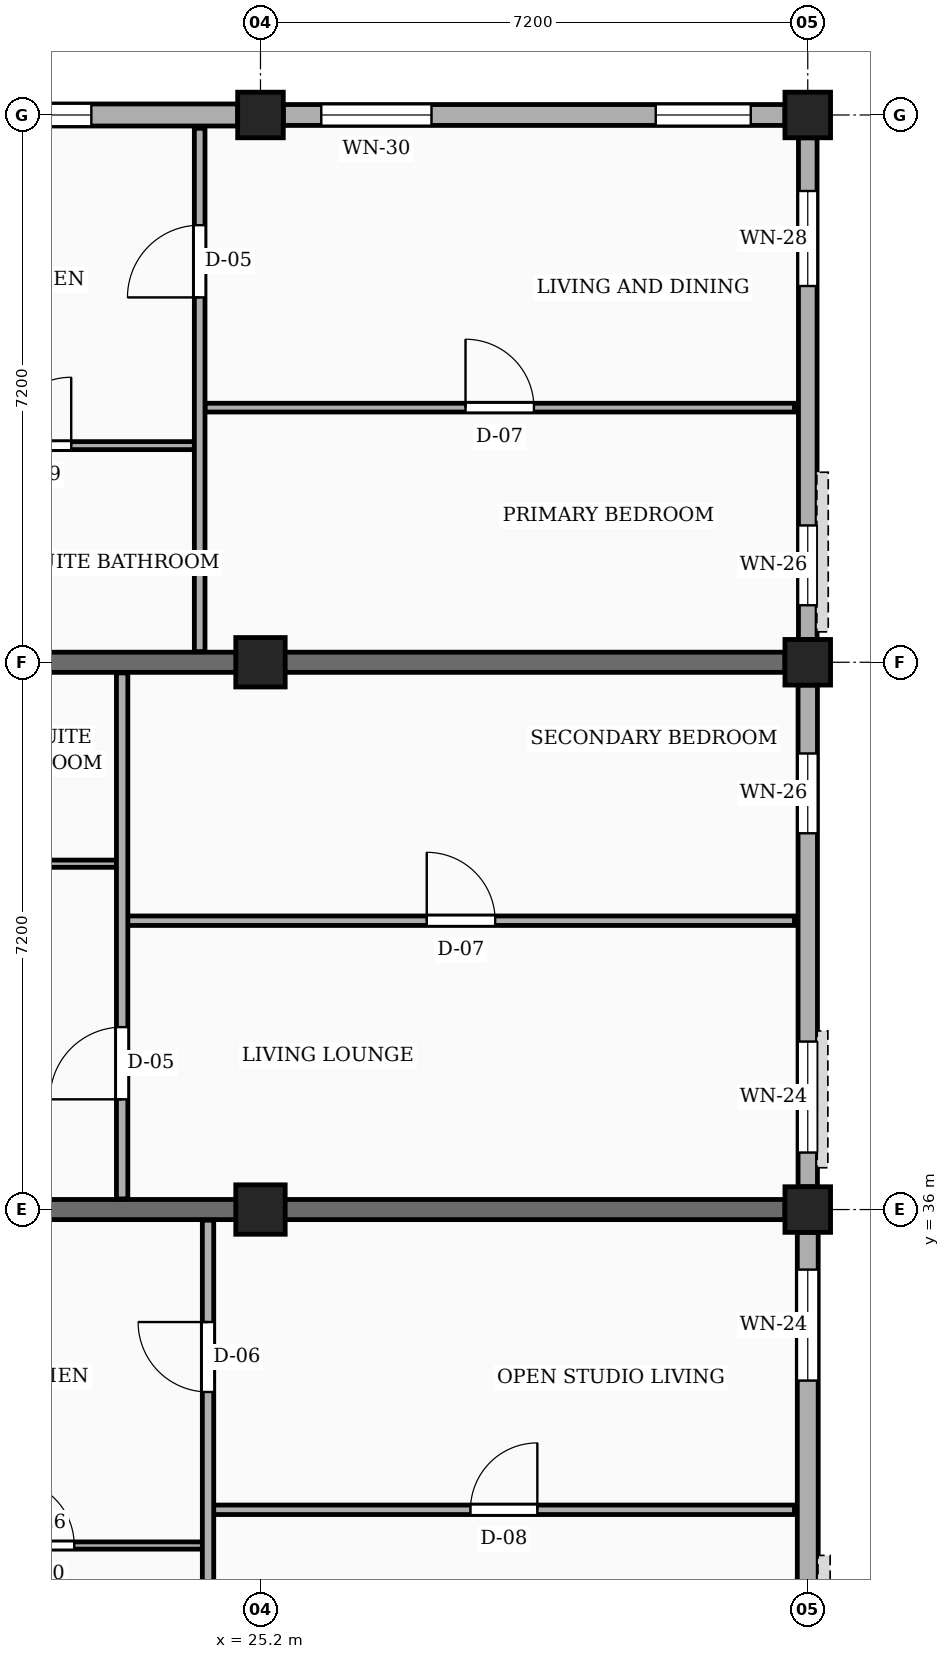
"""IFC4 building model, lengths in metres.
Left out: names, types, materials, properties, quantities, classifications, styles, units other than length and angle.
Written with IfcOpenShell. Run it as: python <this file> out.ifc"""

import sys

from ifc_helpers import new_model, si_unit, direction, frame, frame_2d, origin, origin_2d, place, context, subcontext, project, spatial, rectangle, extrude, element, fill, save


model = new_model("IFC4")
c1 = context("Model", 3, precision=1e-05, world=origin(), true_north=direction((0.0, 1.0)))
c2 = subcontext(c1, "Body", "Model", "MODEL_VIEW")
j1 = project(units=[si_unit("LENGTHUNIT", "METRE"), si_unit("PLANEANGLEUNIT", "RADIAN")], contexts=[c1])
p1 = place(None, origin())
s1 = spatial("IfcSite", under=j1, at=p1, CompositionType="ELEMENT")
p2 = place(p1, origin())
s2 = spatial("IfcBuilding", under=s1, at=p2, CompositionType="ELEMENT")
p3 = place(p2, frame((0.0, 0.0, 4.5)))
s3 = spatial("IfcBuildingStorey", under=s2, at=p3, CompositionType="ELEMENT", Elevation=4.5)
for number, where, z_axis, x_axis in (
    (1, (25.2, 36.0, 0.0), (0.0, 0.0, 1.0), (1.0, 0.0, 0.0)),
    (2, (25.2, 43.2, 0.0), (0.0, 0.0, 1.0), (1.0, 0.0, 0.0)),
):
    element("IfcColumn", number, at=place(p3, frame(where, z_axis=z_axis, x_axis=x_axis)), inside=s3, PredefinedType="COLUMN", context=c2, shape_type="SweptSolid", body=[
        extrude(rectangle(XDim=0.65, YDim=0.65, at=origin_2d()), origin(), (0.0, 0.0, 1.0), 3.15),
    ])
for number, where, z_axis, x_axis in (
    (3, (25.2, 50.4, 0.0), (0.0, 0.0, 1.0), (1.0, 0.0, 0.0)),
    (4, (32.4, 36.0, 0.0), (0.0, 0.0, 1.0), (1.0, 0.0, 0.0)),
    (5, (32.4, 43.2, 0.0), (0.0, 0.0, 1.0), (1.0, 0.0, 0.0)),
    (6, (32.4, 50.4, 0.0), (0.0, 0.0, 1.0), (1.0, 0.0, 0.0)),
):
    element("IfcColumn", number, at=place(p3, frame(where, z_axis=z_axis, x_axis=x_axis)), inside=s3, PredefinedType="COLUMN", context=c2, shape_type="SweptSolid", body=[
        extrude(rectangle(XDim=0.6, YDim=0.6, at=origin_2d()), origin(), (0.0, 0.0, 1.0), 3.15),
    ])
for number, where, z_axis, x_axis in (
    (7, (20.1, 36.0, 0.0), (0.0, 0.0, 1.0), (1.0, 0.0, 0.0)),
    (8, (20.1, 43.2, 0.0), (0.0, 0.0, 1.0), (1.0, 0.0, 0.0)),
):
    element("IfcWall", number, at=place(p3, frame(where, z_axis=z_axis, x_axis=x_axis)), inside=s3, PredefinedType="SOLIDWALL", context=c2, shape_type="SweptSolid", body=[
        extrude(rectangle(XDim=12.0, YDim=0.265, at=frame_2d((6.0, 0.0))), origin(), (0.0, 0.0, 1.0), 2.17),
    ])
p4 = place(p3, frame((32.4, 29.1, 0.0), z_axis=(0.0, 0.0, 1.0), x_axis=(0.0, 1.0, 0.0)))
e9 = element("IfcWall", 9, at=p4, inside=s3, PredefinedType="SOLIDWALL", context=c2, shape_type="SweptSolid", body=[
    extrude(rectangle(XDim=6.6, YDim=0.275, at=frame_2d((3.3, 0.0))), origin(), (0.0, 0.0, 1.0), 2.44),
])
p5 = place(p4, frame((0.45, 0.0, 0.78)))
e10 = element("IfcOpeningElement", 10, at=p5, cuts=e9, PredefinedType="OPENING", context=c2, shape_type="SweptSolid", body=[
    extrude(rectangle(XDim=1.3, YDim=1.36, at=frame_2d((0.65, 0.68))), frame((0.0, 0.147, 0.0), z_axis=(0.0, -1.0, 0.0), x_axis=(1.0, 0.0, 0.0)), (0.0, 0.0, 1.0), 0.295),
])
p6 = place(p4, frame((4.65, 0.0, 0.78)))
e11 = element("IfcOpeningElement", 11, at=p6, cuts=e9, PredefinedType="OPENING", context=c2, shape_type="SweptSolid", body=[
    extrude(rectangle(XDim=1.46, YDim=1.36, at=frame_2d((0.73, 0.68))), frame((0.0, 0.147, 0.0), z_axis=(0.0, -1.0, 0.0), x_axis=(1.0, 0.0, 0.0)), (0.0, 0.0, 1.0), 0.295),
])
p7 = place(p3, frame((32.4, 36.3, 0.0), z_axis=(0.0, 0.0, 1.0), x_axis=(0.0, 1.0, 0.0)))
e12 = element("IfcWall", 12, at=p7, inside=s3, PredefinedType="SOLIDWALL", context=c2, shape_type="SweptSolid", body=[
    extrude(rectangle(XDim=6.6, YDim=0.255, at=frame_2d((3.3, 0.0))), origin(), (0.0, 0.0, 1.0), 2.44),
])
p8 = place(p7, frame((0.45, 0.0, 0.78)))
e13 = element("IfcOpeningElement", 13, at=p8, cuts=e12, PredefinedType="OPENING", context=c2, shape_type="SweptSolid", body=[
    extrude(rectangle(XDim=1.46, YDim=1.36, at=frame_2d((0.73, 0.68))), frame((0.0, 0.137, 0.0), z_axis=(0.0, -1.0, 0.0), x_axis=(1.0, 0.0, 0.0)), (0.0, 0.0, 1.0), 0.275),
])
p9 = place(p7, frame((4.65, 0.0, 0.78)))
e14 = element("IfcOpeningElement", 14, at=p9, cuts=e12, PredefinedType="OPENING", context=c2, shape_type="SweptSolid", body=[
    extrude(rectangle(XDim=1.05, YDim=1.44, at=frame_2d((0.525, 0.72))), frame((0.0, 0.137, 0.0), z_axis=(0.0, -1.0, 0.0), x_axis=(1.0, 0.0, 0.0)), (0.0, 0.0, 1.0), 0.275),
])
p10 = place(p3, frame((32.4, 43.5, 0.0), z_axis=(0.0, 0.0, 1.0), x_axis=(0.0, 1.0, 0.0)))
e15 = element("IfcWall", 15, at=p10, inside=s3, PredefinedType="SOLIDWALL", context=c2, shape_type="SweptSolid", body=[
    extrude(rectangle(XDim=6.6, YDim=0.245, at=frame_2d((3.3, 0.0))), origin(), (0.0, 0.0, 1.0), 2.44),
])
p11 = place(p10, frame((0.45, 0.0, 0.78)))
e16 = element("IfcOpeningElement", 16, at=p11, cuts=e15, PredefinedType="OPENING", context=c2, shape_type="SweptSolid", body=[
    extrude(rectangle(XDim=1.05, YDim=1.44, at=frame_2d((0.525, 0.72))), frame((0.0, 0.133, 0.0), z_axis=(0.0, -1.0, 0.0), x_axis=(1.0, 0.0, 0.0)), (0.0, 0.0, 1.0), 0.265),
])
p12 = place(p10, frame((4.65, 0.0, 0.78)))
e17 = element("IfcOpeningElement", 17, at=p12, cuts=e15, PredefinedType="OPENING", context=c2, shape_type="SweptSolid", body=[
    extrude(rectangle(XDim=1.25, YDim=1.44, at=frame_2d((0.625, 0.72))), frame((0.0, 0.133, 0.0), z_axis=(0.0, -1.0, 0.0), x_axis=(1.0, 0.0, 0.0)), (0.0, 0.0, 1.0), 0.265),
])
p13 = place(p3, frame((32.1, 50.4, 0.0), z_axis=(0.0, 0.0, 1.0), x_axis=(-1.0, 0.0, 0.0)))
e18 = element("IfcWall", 18, at=p13, inside=s3, PredefinedType="SOLIDWALL", context=c2, shape_type="SweptSolid", body=[
    extrude(rectangle(XDim=6.6, YDim=0.275, at=frame_2d((3.3, 0.0))), origin(), (0.0, 0.0, 1.0), 2.44),
])
p14 = place(p13, frame((0.45, 0.0, 0.78)))
e19 = element("IfcOpeningElement", 19, at=p14, cuts=e18, PredefinedType="OPENING", context=c2, shape_type="SweptSolid", body=[
    extrude(rectangle(XDim=1.25, YDim=1.44, at=frame_2d((0.625, 0.72))), frame((0.0, 0.147, 0.0), z_axis=(0.0, -1.0, 0.0), x_axis=(1.0, 0.0, 0.0)), (0.0, 0.0, 1.0), 0.295),
])
p15 = place(p13, frame((4.65, 0.0, 0.78)))
e20 = element("IfcOpeningElement", 20, at=p15, cuts=e18, PredefinedType="OPENING", context=c2, shape_type="SweptSolid", body=[
    extrude(rectangle(XDim=1.45, YDim=1.44, at=frame_2d((0.725, 0.72))), frame((0.0, 0.147, 0.0), z_axis=(0.0, -1.0, 0.0), x_axis=(1.0, 0.0, 0.0)), (0.0, 0.0, 1.0), 0.295),
])
p16 = place(p3, frame((24.9, 50.4, 0.0), z_axis=(0.0, 0.0, 1.0), x_axis=(-1.0, 0.0, 0.0)))
e21 = element("IfcWall", 21, at=p16, inside=s3, PredefinedType="SOLIDWALL", context=c2, shape_type="SweptSolid", body=[
    extrude(rectangle(XDim=6.6, YDim=0.29, at=frame_2d((3.3, 0.0))), origin(), (0.0, 0.0, 1.0), 2.44),
])
p17 = place(p16, frame((1.925, 0.0, 0.78)))
e22 = element("IfcOpeningElement", 22, at=p17, cuts=e21, PredefinedType="OPENING", context=c2, shape_type="SweptSolid", body=[
    extrude(rectangle(XDim=1.45, YDim=1.44, at=frame_2d((0.725, 0.72))), frame((0.0, 0.155, 0.0), z_axis=(0.0, -1.0, 0.0), x_axis=(1.0, 0.0, 0.0)), (0.0, 0.0, 1.0), 0.31),
])
p18 = place(p16, frame((5.17, 0.0, 0.78)))
e23 = element("IfcOpeningElement", 23, at=p18, cuts=e21, PredefinedType="OPENING", context=c2, shape_type="SweptSolid", body=[
    extrude(rectangle(XDim=0.92, YDim=1.15, at=frame_2d((0.46, 0.575))), frame((0.0, 0.155, 0.0), z_axis=(0.0, -1.0, 0.0), x_axis=(1.0, 0.0, 0.0)), (0.0, 0.0, 1.0), 0.31),
])
p19 = place(p3, frame((24.58, 32.05, 0.0), z_axis=(0.0, 0.0, 1.0), x_axis=(1.0, 0.0, 0.0)))
e24 = element("IfcWall", 24, at=p19, inside=s3, PredefinedType="PARTITIONING", context=c2, shape_type="SweptSolid", body=[
    extrude(rectangle(XDim=7.645, YDim=0.125, at=frame_2d((3.823, 0.0))), origin(), (0.0, 0.0, 1.0), 2.305),
])
p20 = place(p19, frame((3.383, 0.0, 0.0)))
e25 = element("IfcOpeningElement", 25, at=p20, cuts=e24, PredefinedType="OPENING", context=c2, shape_type="SweptSolid", body=[
    extrude(rectangle(XDim=0.88, YDim=2.08, at=frame_2d((0.44, 1.04))), frame((0.0, 0.073, 0.0), z_axis=(0.0, -1.0, 0.0), x_axis=(1.0, 0.0, 0.0)), (0.0, 0.0, 1.0), 0.145),
])
p21 = place(p3, frame((20.19, 31.58, 0.0), z_axis=(0.0, 0.0, 1.0), x_axis=(1.0, 0.0, 0.0)))
e26 = element("IfcWall", 26, at=p21, inside=s3, PredefinedType="PARTITIONING", context=c2, shape_type="SweptSolid", body=[
    extrude(rectangle(XDim=4.25, YDim=0.095, at=frame_2d((2.125, 0.0))), origin(), (0.0, 0.0, 1.0), 2.305),
])
p22 = place(p21, frame((1.69, 0.0, 0.0)))
e27 = element("IfcOpeningElement", 27, at=p22, cuts=e26, PredefinedType="OPENING", context=c2, shape_type="SweptSolid", body=[
    extrude(rectangle(XDim=0.87, YDim=2.05, at=frame_2d((0.435, 1.025))), frame((0.0, 0.058, 0.0), z_axis=(0.0, -1.0, 0.0), x_axis=(1.0, 0.0, 0.0)), (0.0, 0.0, 1.0), 0.115),
])
p23 = place(p3, frame((24.51, 28.94, 0.0), z_axis=(0.0, 0.0, 1.0), x_axis=(0.0, 1.0, 0.0)))
e28 = element("IfcWall", 28, at=p23, inside=s3, PredefinedType="PARTITIONING", context=c2, shape_type="SweptSolid", body=[
    extrude(rectangle(XDim=6.92, YDim=0.15, at=frame_2d((3.46, 0.0))), origin(), (0.0, 0.0, 1.0), 2.305),
])
p24 = place(p23, frame((4.66, 0.0, 0.0)))
e29 = element("IfcOpeningElement", 29, at=p24, cuts=e28, PredefinedType="OPENING", context=c2, shape_type="SweptSolid", body=[
    extrude(rectangle(XDim=0.92, YDim=2.1, at=frame_2d((0.46, 1.05))), frame((0.0, 0.085, 0.0), z_axis=(0.0, -1.0, 0.0), x_axis=(1.0, 0.0, 0.0)), (0.0, 0.0, 1.0), 0.17),
])
p25 = place(p3, frame((23.45, 39.8, 0.0), z_axis=(0.0, 0.0, 1.0), x_axis=(1.0, 0.0, 0.0)))
e30 = element("IfcWall", 30, at=p25, inside=s3, PredefinedType="PARTITIONING", context=c2, shape_type="SweptSolid", body=[
    extrude(rectangle(XDim=8.775, YDim=0.125, at=frame_2d((4.388, 0.0))), origin(), (0.0, 0.0, 1.0), 2.305),
])
p26 = place(p25, frame((3.938, 0.0, 0.0)))
e31 = element("IfcOpeningElement", 31, at=p26, cuts=e30, PredefinedType="OPENING", context=c2, shape_type="SweptSolid", body=[
    extrude(rectangle(XDim=0.9, YDim=2.1, at=frame_2d((0.45, 1.05))), frame((0.0, 0.073, 0.0), z_axis=(0.0, -1.0, 0.0), x_axis=(1.0, 0.0, 0.0)), (0.0, 0.0, 1.0), 0.145),
])
p27 = place(p3, frame((20.19, 40.55, 0.0), z_axis=(0.0, 0.0, 1.0), x_axis=(1.0, 0.0, 0.0)))
e32 = element("IfcWall", 32, at=p27, inside=s3, PredefinedType="PARTITIONING", context=c2, shape_type="SweptSolid", body=[
    extrude(rectangle(XDim=3.12, YDim=0.095, at=frame_2d((1.56, 0.0))), origin(), (0.0, 0.0, 1.0), 2.305),
])
p28 = place(p27, frame((1.11, 0.0, 0.0)))
e33 = element("IfcOpeningElement", 33, at=p28, cuts=e32, PredefinedType="OPENING", context=c2, shape_type="SweptSolid", body=[
    extrude(rectangle(XDim=0.9, YDim=2.05, at=frame_2d((0.45, 1.025))), frame((0.0, 0.058, 0.0), z_axis=(0.0, -1.0, 0.0), x_axis=(1.0, 0.0, 0.0)), (0.0, 0.0, 1.0), 0.115),
])
p29 = place(p3, frame((23.38, 36.14, 0.0), z_axis=(0.0, 0.0, 1.0), x_axis=(0.0, 1.0, 0.0)))
e34 = element("IfcWall", 34, at=p29, inside=s3, PredefinedType="PARTITIONING", context=c2, shape_type="SweptSolid", body=[
    extrude(rectangle(XDim=6.92, YDim=0.15, at=frame_2d((3.46, 0.0))), origin(), (0.0, 0.0, 1.0), 2.305),
])
p30 = place(p29, frame((1.31, 0.0, 0.0)))
e35 = element("IfcOpeningElement", 35, at=p30, cuts=e34, PredefinedType="OPENING", context=c2, shape_type="SweptSolid", body=[
    extrude(rectangle(XDim=0.95, YDim=2.1, at=frame_2d((0.475, 1.05))), frame((0.0, 0.085, 0.0), z_axis=(0.0, -1.0, 0.0), x_axis=(1.0, 0.0, 0.0)), (0.0, 0.0, 1.0), 0.17),
])
p31 = place(p3, frame((24.47, 46.55, 0.0), z_axis=(0.0, 0.0, 1.0), x_axis=(1.0, 0.0, 0.0)))
e36 = element("IfcWall", 36, at=p31, inside=s3, PredefinedType="PARTITIONING", context=c2, shape_type="SweptSolid", body=[
    extrude(rectangle(XDim=7.755, YDim=0.115, at=frame_2d((3.877, 0.0))), origin(), (0.0, 0.0, 1.0), 2.305),
])
p32 = place(p31, frame((3.427, 0.0, 0.0)))
e37 = element("IfcOpeningElement", 37, at=p32, cuts=e36, PredefinedType="OPENING", context=c2, shape_type="SweptSolid", body=[
    extrude(rectangle(XDim=0.9, YDim=2.1, at=frame_2d((0.45, 1.05))), frame((0.0, 0.067, 0.0), z_axis=(0.0, -1.0, 0.0), x_axis=(1.0, 0.0, 0.0)), (0.0, 0.0, 1.0), 0.135),
])
p33 = place(p3, frame((20.19, 46.05, 0.0), z_axis=(0.0, 0.0, 1.0), x_axis=(1.0, 0.0, 0.0)))
e38 = element("IfcWall", 38, at=p33, inside=s3, PredefinedType="PARTITIONING", context=c2, shape_type="SweptSolid", body=[
    extrude(rectangle(XDim=4.14, YDim=0.105, at=frame_2d((2.07, 0.0))), origin(), (0.0, 0.0, 1.0), 2.305),
])
p34 = place(p33, frame((1.62, 0.0, 0.0)))
e39 = element("IfcOpeningElement", 39, at=p34, cuts=e38, PredefinedType="OPENING", context=c2, shape_type="SweptSolid", body=[
    extrude(rectangle(XDim=0.9, YDim=2.05, at=frame_2d((0.45, 1.025))), frame((0.0, 0.062, 0.0), z_axis=(0.0, -1.0, 0.0), x_axis=(1.0, 0.0, 0.0)), (0.0, 0.0, 1.0), 0.125),
])
p35 = place(p3, frame((24.4, 43.34, 0.0), z_axis=(0.0, 0.0, 1.0), x_axis=(0.0, 1.0, 0.0)))
e40 = element("IfcWall", 40, at=p35, inside=s3, PredefinedType="PARTITIONING", context=c2, shape_type="SweptSolid", body=[
    extrude(rectangle(XDim=6.885, YDim=0.14, at=frame_2d((3.442, 0.0))), origin(), (0.0, 0.0, 1.0), 2.305),
])
p36 = place(p35, frame((4.66, 0.0, 0.0)))
e41 = element("IfcOpeningElement", 41, at=p36, cuts=e40, PredefinedType="OPENING", context=c2, shape_type="SweptSolid", body=[
    extrude(rectangle(XDim=0.95, YDim=2.1, at=frame_2d((0.475, 1.05))), frame((0.0, 0.08, 0.0), z_axis=(0.0, -1.0, 0.0), x_axis=(1.0, 0.0, 0.0)), (0.0, 0.0, 1.0), 0.16),
])
p37 = place(p6, origin())
e42 = element("IfcWindow", 42, at=p37, inside=s3, PartitioningType="SINGLE_PANEL", PredefinedType="WINDOW", context=c2, shape_type="SweptSolid", body=[
    extrude(rectangle(XDim=1.46, YDim=1.36, at=frame_2d((0.73, 0.68))), frame((0.0, 0.03, 0.0), z_axis=(0.0, -1.0, 0.0), x_axis=(1.0, 0.0, 0.0)), (0.0, 0.0, 1.0), 0.06),
])
fill(e11, e42)
p38 = place(p8, origin())
e43 = element("IfcWindow", 43, at=p38, inside=s3, PartitioningType="SINGLE_PANEL", PredefinedType="WINDOW", context=c2, shape_type="SweptSolid", body=[
    extrude(rectangle(XDim=1.46, YDim=1.36, at=frame_2d((0.73, 0.68))), frame((0.0, 0.03, 0.0), z_axis=(0.0, -1.0, 0.0), x_axis=(1.0, 0.0, 0.0)), (0.0, 0.0, 1.0), 0.06),
])
fill(e13, e43)
p39 = place(p9, origin())
e44 = element("IfcWindow", 44, at=p39, inside=s3, PartitioningType="SINGLE_PANEL", PredefinedType="WINDOW", context=c2, shape_type="SweptSolid", body=[
    extrude(rectangle(XDim=1.05, YDim=1.44, at=frame_2d((0.525, 0.72))), frame((0.0, 0.03, 0.0), z_axis=(0.0, -1.0, 0.0), x_axis=(1.0, 0.0, 0.0)), (0.0, 0.0, 1.0), 0.06),
])
fill(e14, e44)
p40 = place(p11, origin())
e45 = element("IfcWindow", 45, at=p40, inside=s3, PartitioningType="SINGLE_PANEL", PredefinedType="WINDOW", context=c2, shape_type="SweptSolid", body=[
    extrude(rectangle(XDim=1.05, YDim=1.44, at=frame_2d((0.525, 0.72))), frame((0.0, 0.03, 0.0), z_axis=(0.0, -1.0, 0.0), x_axis=(1.0, 0.0, 0.0)), (0.0, 0.0, 1.0), 0.06),
])
fill(e16, e45)
p41 = place(p12, origin())
e46 = element("IfcWindow", 46, at=p41, inside=s3, PartitioningType="SINGLE_PANEL", PredefinedType="WINDOW", context=c2, shape_type="SweptSolid", body=[
    extrude(rectangle(XDim=1.25, YDim=1.44, at=frame_2d((0.625, 0.72))), frame((0.0, 0.03, 0.0), z_axis=(0.0, -1.0, 0.0), x_axis=(1.0, 0.0, 0.0)), (0.0, 0.0, 1.0), 0.06),
])
fill(e17, e46)
p42 = place(p14, origin())
e47 = element("IfcWindow", 47, at=p42, inside=s3, PartitioningType="SINGLE_PANEL", PredefinedType="WINDOW", context=c2, shape_type="SweptSolid", body=[
    extrude(rectangle(XDim=1.25, YDim=1.44, at=frame_2d((0.625, 0.72))), frame((0.0, 0.03, 0.0), z_axis=(0.0, -1.0, 0.0), x_axis=(1.0, 0.0, 0.0)), (0.0, 0.0, 1.0), 0.06),
])
fill(e19, e47)
p43 = place(p15, origin())
e48 = element("IfcWindow", 48, at=p43, inside=s3, PartitioningType="SINGLE_PANEL", PredefinedType="WINDOW", context=c2, shape_type="SweptSolid", body=[
    extrude(rectangle(XDim=1.45, YDim=1.44, at=frame_2d((0.725, 0.72))), frame((0.0, 0.03, 0.0), z_axis=(0.0, -1.0, 0.0), x_axis=(1.0, 0.0, 0.0)), (0.0, 0.0, 1.0), 0.06),
])
fill(e20, e48)
p44 = place(p17, origin())
e49 = element("IfcWindow", 49, at=p44, inside=s3, PartitioningType="SINGLE_PANEL", PredefinedType="WINDOW", context=c2, shape_type="SweptSolid", body=[
    extrude(rectangle(XDim=1.45, YDim=1.44, at=frame_2d((0.725, 0.72))), frame((0.0, 0.03, 0.0), z_axis=(0.0, -1.0, 0.0), x_axis=(1.0, 0.0, 0.0)), (0.0, 0.0, 1.0), 0.06),
])
fill(e22, e49)
p45 = place(p20, origin())
e50 = element("IfcDoor", 50, at=p45, inside=s3, OperationType="SINGLE_SWING_RIGHT", PredefinedType="DOOR", context=c2, shape_type="SweptSolid", body=[
    extrude(rectangle(XDim=0.88, YDim=2.08, at=frame_2d((0.44, 1.04))), frame((0.0, 0.025, 0.0), z_axis=(0.0, -1.0, 0.0), x_axis=(1.0, 0.0, 0.0)), (0.0, 0.0, 1.0), 0.05),
])
fill(e25, e50)
p46 = place(p22, origin())
e51 = element("IfcDoor", 51, at=p46, inside=s3, OperationType="SINGLE_SWING_LEFT", PredefinedType="DOOR", context=c2, shape_type="SweptSolid", body=[
    extrude(rectangle(XDim=0.87, YDim=2.05, at=frame_2d((0.435, 1.025))), frame((0.0, 0.025, 0.0), z_axis=(0.0, -1.0, 0.0), x_axis=(1.0, 0.0, 0.0)), (0.0, 0.0, 1.0), 0.05),
])
fill(e27, e51)
p47 = place(p24, origin())
e52 = element("IfcDoor", 52, at=p47, inside=s3, OperationType="SINGLE_SWING_RIGHT", PredefinedType="DOOR", context=c2, shape_type="SweptSolid", body=[
    extrude(rectangle(XDim=0.92, YDim=2.1, at=frame_2d((0.46, 1.05))), frame((0.0, 0.025, 0.0), z_axis=(0.0, -1.0, 0.0), x_axis=(1.0, 0.0, 0.0)), (0.0, 0.0, 1.0), 0.05),
])
fill(e29, e52)
p48 = place(p26, origin())
e53 = element("IfcDoor", 53, at=p48, inside=s3, OperationType="SINGLE_SWING_LEFT", PredefinedType="DOOR", context=c2, shape_type="SweptSolid", body=[
    extrude(rectangle(XDim=0.9, YDim=2.1, at=frame_2d((0.45, 1.05))), frame((0.0, 0.025, 0.0), z_axis=(0.0, -1.0, 0.0), x_axis=(1.0, 0.0, 0.0)), (0.0, 0.0, 1.0), 0.05),
])
fill(e31, e53)
p49 = place(p30, origin())
e54 = element("IfcDoor", 54, at=p49, inside=s3, OperationType="SINGLE_SWING_LEFT", PredefinedType="DOOR", context=c2, shape_type="SweptSolid", body=[
    extrude(rectangle(XDim=0.95, YDim=2.1, at=frame_2d((0.475, 1.05))), frame((0.0, 0.025, 0.0), z_axis=(0.0, -1.0, 0.0), x_axis=(1.0, 0.0, 0.0)), (0.0, 0.0, 1.0), 0.05),
])
fill(e35, e54)
p50 = place(p32, origin())
e55 = element("IfcDoor", 55, at=p50, inside=s3, OperationType="SINGLE_SWING_LEFT", PredefinedType="DOOR", context=c2, shape_type="SweptSolid", body=[
    extrude(rectangle(XDim=0.9, YDim=2.1, at=frame_2d((0.45, 1.05))), frame((0.0, 0.025, 0.0), z_axis=(0.0, -1.0, 0.0), x_axis=(1.0, 0.0, 0.0)), (0.0, 0.0, 1.0), 0.05),
])
fill(e37, e55)
p51 = place(p34, origin())
e56 = element("IfcDoor", 56, at=p51, inside=s3, OperationType="SINGLE_SWING_RIGHT", PredefinedType="DOOR", context=c2, shape_type="SweptSolid", body=[
    extrude(rectangle(XDim=0.9, YDim=2.05, at=frame_2d((0.45, 1.025))), frame((0.0, 0.025, 0.0), z_axis=(0.0, -1.0, 0.0), x_axis=(1.0, 0.0, 0.0)), (0.0, 0.0, 1.0), 0.05),
])
fill(e39, e56)
p52 = place(p36, origin())
e57 = element("IfcDoor", 57, at=p52, inside=s3, OperationType="SINGLE_SWING_LEFT", PredefinedType="DOOR", context=c2, shape_type="SweptSolid", body=[
    extrude(rectangle(XDim=0.95, YDim=2.1, at=frame_2d((0.475, 1.05))), frame((0.0, 0.025, 0.0), z_axis=(0.0, -1.0, 0.0), x_axis=(1.0, 0.0, 0.0)), (0.0, 0.0, 1.0), 0.05),
])
fill(e41, e57)
save(model, sys.argv[1])
